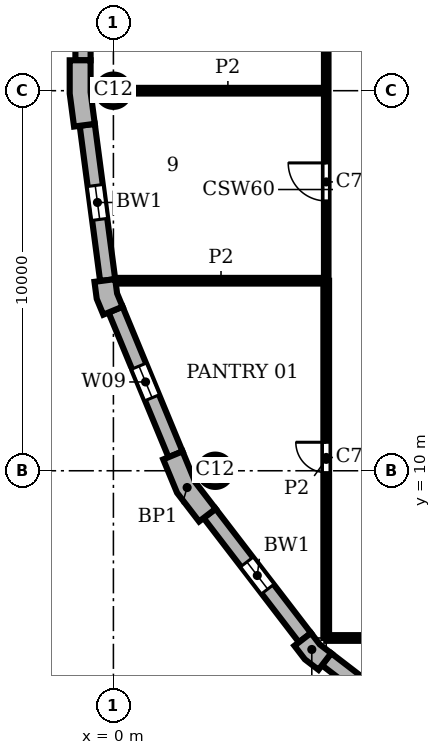
"""IFC4 building model, lengths in metres.
Left out: names, types, materials, properties, quantities, classifications, styles, units other than length and angle.
Written with IfcOpenShell. Run it as: python <this file> out.ifc"""

import sys

from ifc_helpers import new_model, si_unit, direction, frame, frame_2d, origin, origin_2d, place, context, subcontext, project, spatial, polyline, rectangle, circle, outline, extrude, element, fill, save


model = new_model("IFC4")
c1 = context("Model", 3, precision=1e-05, world=origin(), true_north=direction((0.0, 1.0)))
c2 = subcontext(c1, "Body", "Model", "MODEL_VIEW")
j1 = project(units=[si_unit("LENGTHUNIT", "METRE"), si_unit("PLANEANGLEUNIT", "RADIAN")], contexts=[c1])
p1 = place(None, origin())
s1 = spatial("IfcSite", under=j1, at=p1, CompositionType="ELEMENT")
p2 = place(p1, origin())
s2 = spatial("IfcBuilding", under=s1, at=p2, CompositionType="ELEMENT")
p3 = place(p2, frame((0.0, 0.0, 313.8)))
s3 = spatial("IfcBuildingStorey", under=s2, at=p3, CompositionType="ELEMENT", Elevation=313.8)
for number, where, z_axis, x_axis in (
    (1, (0.0, 20.0, 0.0), (0.0, 0.0, 1.0), (1.0, 0.0, 0.0)),
    (2, (2.679, 10.0, 0.0), (0.0, 0.0, 1.0), (1.0, 0.0, 0.0)),
):
    element("IfcColumn", number, at=place(p3, frame(where, z_axis=z_axis, x_axis=x_axis)), inside=s3, PredefinedType="COLUMN", context=c2, shape_type="SweptSolid", body=[
        extrude(circle(Radius=0.425, at=origin_2d()), origin(), (0.0, 0.0, 1.0), 3.9),
    ])
p4 = place(p3, origin())
e3 = element("IfcWall", 3, at=p4, inside=s3, PredefinedType="SOLIDWALL", context=c2, shape_type="SweptSolid", body=[
    extrude(outline(polyline([(-1.0, 20.8), (-1.15, 20.8), (-1.15, 19.925), (-1.036, 19.057), (-0.887, 19.076), (-0.49, 19.128), (-0.6, 19.961), (-0.6, 20.8), (-1.0, 20.8)])), origin(), (0.0, 0.0, 1.0), 3.9),
])
e4 = element("IfcWall", 4, at=p4, inside=s3, PredefinedType="SOLIDWALL", context=c2, shape_type="SweptSolid", body=[
    extrude(outline(polyline([(-0.349, 14.99), (-0.498, 14.971), (-0.439, 14.523), (-0.266, 14.106), (-0.128, 14.164), (0.242, 14.317), (0.097, 14.667), (0.047, 15.043), (-0.349, 14.99)])), origin(), (0.0, 0.0, 1.0), 3.9),
])
e5 = element("IfcWall", 5, at=p4, inside=s3, PredefinedType="SOLIDWALL", context=c2, shape_type="SweptSolid", body=[
    extrude(outline(polyline([(1.449, 10.356), (1.311, 10.299), (1.675, 9.42), (2.254, 8.665), (2.373, 8.757), (2.69, 9.0), (2.155, 9.698), (1.819, 10.51), (1.449, 10.356)])), origin(), (0.0, 0.0, 1.0), 3.9),
])
e6 = element("IfcWall", 6, at=p4, inside=s3, PredefinedType="SOLIDWALL", context=c2, shape_type="SweptSolid", body=[
    extrude(outline(polyline([(4.882, 5.487), (4.763, 5.396), (5.038, 5.038), (5.396, 4.763), (5.487, 4.882), (5.731, 5.199), (5.43, 5.43), (5.199, 5.731), (4.882, 5.487)])), origin(), (0.0, 0.0, 1.0), 3.9),
])
p5 = place(p3, frame((-0.8, 39.2, 0.0), z_axis=(0.0, 0.0, 1.0), x_axis=(0.0, -1.0, 0.0)))
e7 = element("IfcWall", 7, at=p5, inside=s3, PredefinedType="SOLIDWALL", context=c2, shape_type="SweptSolid", body=[
    extrude(rectangle(XDim=18.4, YDim=0.4, at=frame_2d((9.2, 0.0))), origin(), (0.0, 0.0, 1.0), 3.9),
])
p6 = place(p5, frame((3.75, 0.0, 0.9)))
e8 = element("IfcOpeningElement", 8, at=p6, cuts=e7, PredefinedType="OPENING", context=c2, shape_type="SweptSolid", body=[
    extrude(rectangle(XDim=0.9, YDim=2.35, at=frame_2d((0.45, 1.175))), frame((0.0, 0.21, 0.0), z_axis=(0.0, -1.0, 0.0), x_axis=(1.0, 0.0, 0.0)), (0.0, 0.0, 1.0), 0.42),
])
p7 = place(p5, frame((13.75, 0.0, 0.9)))
e9 = element("IfcOpeningElement", 9, at=p7, cuts=e7, PredefinedType="OPENING", context=c2, shape_type="SweptSolid", body=[
    extrude(rectangle(XDim=0.9, YDim=2.35, at=frame_2d((0.45, 1.175))), frame((0.0, 0.21, 0.0), z_axis=(0.0, -1.0, 0.0), x_axis=(1.0, 0.0, 0.0)), (0.0, 0.0, 1.0), 0.42),
])
p8 = place(p3, frame((-0.689, 19.102, 0.0), z_axis=(0.0, 0.0, 1.0), x_axis=(0.130514280502, -0.991446429508, 0.0)))
e10 = element("IfcWall", 10, at=p8, inside=s3, PredefinedType="SOLIDWALL", context=c2, shape_type="SweptSolid", body=[
    extrude(rectangle(XDim=4.121, YDim=0.4, at=frame_2d((2.061, 0.0))), origin(), (0.0, 0.0, 1.0), 3.9),
])
p9 = place(p8, frame((1.611, 0.0, 0.9)))
e11 = element("IfcOpeningElement", 11, at=p9, cuts=e10, PredefinedType="OPENING", context=c2, shape_type="SweptSolid", body=[
    extrude(rectangle(XDim=0.9, YDim=2.35, at=frame_2d((0.45, 1.175))), frame((0.0, 0.21, 0.0), z_axis=(0.0, -1.0, 0.0), x_axis=(1.0, 0.0, 0.0)), (0.0, 0.0, 1.0), 0.42),
])
p10 = place(p3, frame((0.057, 14.24, 0.0), z_axis=(0.0, 0.0, 1.0), x_axis=(0.382721546029, -0.923863744394, 0.0)))
e12 = element("IfcWall", 12, at=p10, inside=s3, PredefinedType="SOLIDWALL", context=c2, shape_type="SweptSolid", body=[
    extrude(rectangle(XDim=4.121, YDim=0.4, at=frame_2d((2.061, 0.0))), origin(), (0.0, 0.0, 1.0), 3.9),
])
p11 = place(p10, frame((1.611, 0.0, 0.9)))
e13 = element("IfcOpeningElement", 13, at=p11, cuts=e12, PredefinedType="OPENING", context=c2, shape_type="SweptSolid", body=[
    extrude(rectangle(XDim=0.9, YDim=2.35, at=frame_2d((0.45, 1.175))), frame((0.0, 0.21, 0.0), z_axis=(0.0, -1.0, 0.0), x_axis=(1.0, 0.0, 0.0)), (0.0, 0.0, 1.0), 0.42),
])
p12 = place(p3, frame((2.532, 8.878, 0.0), z_axis=(0.0, 0.0, 1.0), x_axis=(0.608759824817, -0.793354571229, 0.0)))
e14 = element("IfcWall", 14, at=p12, inside=s3, PredefinedType="SOLIDWALL", context=c2, shape_type="SweptSolid", body=[
    extrude(rectangle(XDim=4.121, YDim=0.4, at=frame_2d((2.061, 0.0))), origin(), (0.0, 0.0, 1.0), 3.9),
])
p13 = place(p12, frame((1.611, 0.0, 0.9)))
e15 = element("IfcOpeningElement", 15, at=p13, cuts=e14, PredefinedType="OPENING", context=c2, shape_type="SweptSolid", body=[
    extrude(rectangle(XDim=0.9, YDim=2.35, at=frame_2d((0.45, 1.175))), frame((0.0, 0.21, 0.0), z_axis=(0.0, -1.0, 0.0), x_axis=(1.0, 0.0, 0.0)), (0.0, 0.0, 1.0), 0.42),
])
p14 = place(p3, frame((5.609, 5.041, 0.0), z_axis=(0.0, 0.0, 1.0), x_axis=(0.793354571229, -0.608759824817, 0.0)))
e16 = element("IfcWall", 16, at=p14, inside=s3, PredefinedType="SOLIDWALL", context=c2, shape_type="SweptSolid", body=[
    extrude(rectangle(XDim=4.121, YDim=0.4, at=frame_2d((2.061, 0.0))), origin(), (0.0, 0.0, 1.0), 3.9),
])
p15 = place(p14, frame((1.611, 0.0, 0.9)))
e17 = element("IfcOpeningElement", 17, at=p15, cuts=e16, PredefinedType="OPENING", context=c2, shape_type="SweptSolid", body=[
    extrude(rectangle(XDim=0.9, YDim=2.35, at=frame_2d((0.45, 1.175))), frame((0.0, 0.21, 0.0), z_axis=(0.0, -1.0, 0.0), x_axis=(1.0, 0.0, 0.0)), (0.0, 0.0, 1.0), 0.42),
])
p16 = place(p3, frame((5.6, 5.6, 0.0), z_axis=(0.0, 0.0, 1.0), x_axis=(0.0, 1.0, 0.0)))
e18 = element("IfcWall", 18, at=p16, inside=s3, PredefinedType="PARTITIONING", context=c2, shape_type="SweptSolid", body=[
    extrude(rectangle(XDim=9.4, YDim=0.15, at=frame_2d((4.7, 0.0))), origin(), (0.0, 0.0, 1.0), 3.58),
])
p17 = place(p16, frame((4.35, 0.0, 0.0)))
e19 = element("IfcOpeningElement", 19, at=p17, cuts=e18, PredefinedType="OPENING", context=c2, shape_type="SweptSolid", body=[
    extrude(rectangle(XDim=0.8, YDim=2.1, at=frame_2d((0.4, 1.05))), frame((0.0, 0.085, 0.0), z_axis=(0.0, -1.0, 0.0), x_axis=(1.0, 0.0, 0.0)), (0.0, 0.0, 1.0), 0.17),
])
p18 = place(p3, frame((5.6, 5.6, 0.0), z_axis=(0.0, 0.0, 1.0), x_axis=(1.0, 0.0, 0.0)))
e20 = element("IfcWall", 20, at=p18, inside=s3, PredefinedType="PARTITIONING", context=c2, shape_type="SweptSolid", body=[
    extrude(rectangle(XDim=25.4, YDim=0.15, at=frame_2d((12.7, 0.0))), origin(), (0.0, 0.0, 1.0), 3.58),
])
p19 = place(p18, frame((14.85, 0.0, 0.0)))
e21 = element("IfcOpeningElement", 21, at=p19, cuts=e20, PredefinedType="OPENING", context=c2, shape_type="SweptSolid", body=[
    extrude(rectangle(XDim=1.8, YDim=2.1, at=frame_2d((0.9, 1.05))), frame((0.0, 0.085, 0.0), z_axis=(0.0, -1.0, 0.0), x_axis=(1.0, 0.0, 0.0)), (0.0, 0.0, 1.0), 0.17),
])
p20 = place(p3, frame((0.063, 15.0, 0.0), z_axis=(0.0, 0.0, 1.0), x_axis=(1.0, 0.0, 0.0)))
e22 = element("IfcWall", 22, at=p20, inside=s3, PredefinedType="PARTITIONING", context=c2, shape_type="SweptSolid", body=[
    extrude(rectangle(XDim=5.537, YDim=0.15, at=frame_2d((2.769, 0.0))), origin(), (0.0, 0.0, 1.0), 3.58),
])
p21 = place(p3, frame((0.425, 20.0, 0.0), z_axis=(0.0, 0.0, 1.0), x_axis=(1.0, 0.0, 0.0)))
e23 = element("IfcWall", 23, at=p21, inside=s3, PredefinedType="PARTITIONING", context=c2, shape_type="SweptSolid", body=[
    extrude(rectangle(XDim=5.175, YDim=0.15, at=frame_2d((2.587, 0.0))), origin(), (0.0, 0.0, 1.0), 3.58),
])
p22 = place(p3, frame((5.6, 15.0, 0.0), z_axis=(0.0, 0.0, 1.0), x_axis=(0.0, 1.0, 0.0)))
e24 = element("IfcWall", 24, at=p22, inside=s3, PredefinedType="PARTITIONING", context=c2, shape_type="SweptSolid", body=[
    extrude(rectangle(XDim=13.0, YDim=0.12, at=frame_2d((6.5, 0.0))), origin(), (0.0, 0.0, 1.0), 3.58),
])
p23 = place(p22, frame((2.1, 0.0, 0.0)))
e25 = element("IfcOpeningElement", 25, at=p23, cuts=e24, PredefinedType="OPENING", context=c2, shape_type="SweptSolid", body=[
    extrude(rectangle(XDim=1.0, YDim=2.1, at=frame_2d((0.5, 1.05))), frame((0.0, 0.07, 0.0), z_axis=(0.0, -1.0, 0.0), x_axis=(1.0, 0.0, 0.0)), (0.0, 0.0, 1.0), 0.14),
])
p24 = place(p9, origin())
e26 = element("IfcWindow", 26, at=p24, inside=s3, PartitioningType="SINGLE_PANEL", PredefinedType="WINDOW", context=c2, shape_type="SweptSolid", body=[
    extrude(rectangle(XDim=0.9, YDim=2.35, at=frame_2d((0.45, 1.175))), frame((0.0, 0.16, 0.0), z_axis=(0.0, -1.0, 0.0), x_axis=(1.0, 0.0, 0.0)), (0.0, 0.0, 1.0), 0.06),
])
fill(e11, e26)
p25 = place(p11, origin())
e27 = element("IfcWindow", 27, at=p25, inside=s3, PartitioningType="SINGLE_PANEL", PredefinedType="WINDOW", context=c2, shape_type="SweptSolid", body=[
    extrude(rectangle(XDim=0.9, YDim=2.35, at=frame_2d((0.45, 1.175))), frame((0.0, 0.16, 0.0), z_axis=(0.0, -1.0, 0.0), x_axis=(1.0, 0.0, 0.0)), (0.0, 0.0, 1.0), 0.06),
])
fill(e13, e27)
p26 = place(p13, origin())
e28 = element("IfcWindow", 28, at=p26, inside=s3, PartitioningType="SINGLE_PANEL", PredefinedType="WINDOW", context=c2, shape_type="SweptSolid", body=[
    extrude(rectangle(XDim=0.9, YDim=2.35, at=frame_2d((0.45, 1.175))), frame((0.0, 0.16, 0.0), z_axis=(0.0, -1.0, 0.0), x_axis=(1.0, 0.0, 0.0)), (0.0, 0.0, 1.0), 0.06),
])
fill(e15, e28)
p27 = place(p17, origin())
e29 = element("IfcDoor", 29, at=p27, inside=s3, OperationType="SINGLE_SWING_RIGHT", PredefinedType="DOOR", context=c2, shape_type="SweptSolid", body=[
    extrude(rectangle(XDim=0.8, YDim=2.1, at=frame_2d((0.4, 1.05))), frame((0.0, 0.025, 0.0), z_axis=(0.0, -1.0, 0.0), x_axis=(1.0, 0.0, 0.0)), (0.0, 0.0, 1.0), 0.05),
])
fill(e19, e29)
p28 = place(p23, origin())
e30 = element("IfcDoor", 30, at=p28, inside=s3, OperationType="SINGLE_SWING_RIGHT", PredefinedType="DOOR", context=c2, shape_type="SweptSolid", body=[
    extrude(rectangle(XDim=1.0, YDim=2.1, at=frame_2d((0.5, 1.05))), frame((0.0, 0.025, 0.0), z_axis=(0.0, -1.0, 0.0), x_axis=(1.0, 0.0, 0.0)), (0.0, 0.0, 1.0), 0.05),
])
fill(e25, e30)
save(model, sys.argv[1])
